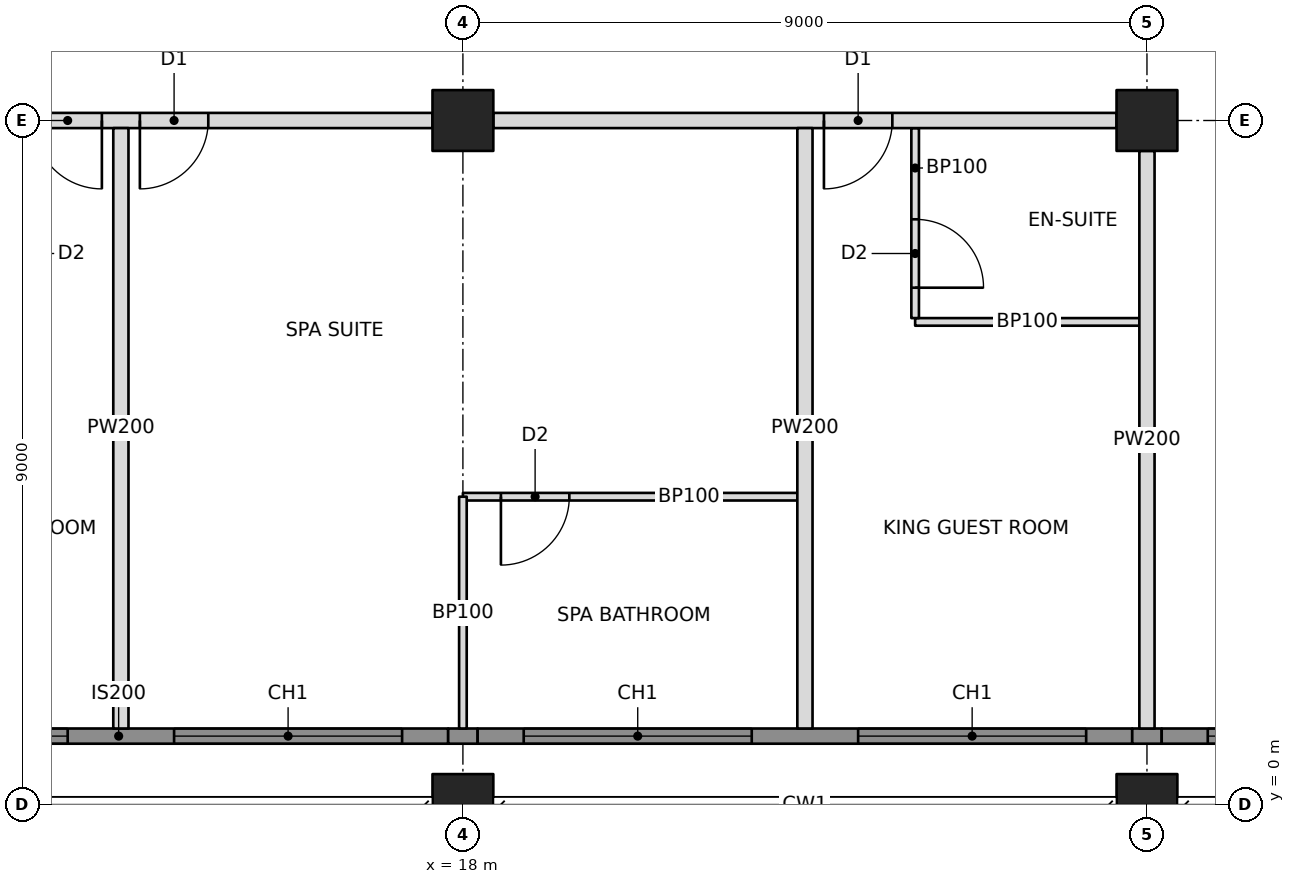
"""IFC4 building model, lengths in metres.
Left out: names, types, materials, properties, quantities, classifications, styles, units other than length and angle.
Written with IfcOpenShell. Run it as: python <this file> out.ifc"""

import sys

from ifc_helpers import new_model, si_unit, direction, frame, frame_2d, origin, origin_2d, place, context, subcontext, project, spatial, rectangle, hollow_rectangle, extrude, element, fill, save


model = new_model("IFC4")
c1 = context("Model", 3, precision=1e-05, world=origin(), true_north=direction((0.0, 1.0)))
c2 = subcontext(c1, "Body", "Model", "MODEL_VIEW")
j1 = project(units=[si_unit("LENGTHUNIT", "METRE"), si_unit("PLANEANGLEUNIT", "RADIAN")], contexts=[c1])
p1 = place(None, origin())
s1 = spatial("IfcSite", under=j1, at=p1, CompositionType="ELEMENT")
p2 = place(p1, origin())
s2 = spatial("IfcBuilding", under=s1, at=p2, CompositionType="ELEMENT")
p3 = place(p2, frame((0.0, 0.0, 124.8)))
s3 = spatial("IfcBuildingStorey", under=s2, at=p3, CompositionType="ELEMENT", Elevation=124.8)
p4 = place(p3, frame((18.0, 0.0, 0.0), z_axis=(0.0, 0.0, 1.0), x_axis=(1.0, 0.0, 0.0)))
e1 = element("IfcColumn", 1, at=p4, inside=s3, PredefinedType="COLUMN", context=c2, shape_type="SweptSolid", body=[
    extrude(hollow_rectangle(XDim=0.8, YDim=0.8, WallThickness=0.06, at=origin_2d()), origin(), (0.0, 0.0, 1.0), 3.4),
])
p5 = place(p3, frame((18.0, 9.0, 0.0), z_axis=(0.0, 0.0, 1.0), x_axis=(1.0, 0.0, 0.0)))
e2 = element("IfcColumn", 2, at=p5, inside=s3, PredefinedType="COLUMN", context=c2, shape_type="SweptSolid", body=[
    extrude(hollow_rectangle(XDim=0.8, YDim=0.8, WallThickness=0.07, at=origin_2d()), origin(), (0.0, 0.0, 1.0), 3.4),
])
p6 = place(p3, frame((27.0, 0.0, 0.0), z_axis=(0.0, 0.0, 1.0), x_axis=(1.0, 0.0, 0.0)))
e3 = element("IfcColumn", 3, at=p6, inside=s3, PredefinedType="COLUMN", context=c2, shape_type="SweptSolid", body=[
    extrude(hollow_rectangle(XDim=0.8, YDim=0.8, WallThickness=0.06, at=origin_2d()), origin(), (0.0, 0.0, 1.0), 3.4),
])
p7 = place(p3, frame((27.0, 9.0, 0.0), z_axis=(0.0, 0.0, 1.0), x_axis=(1.0, 0.0, 0.0)))
e4 = element("IfcColumn", 4, at=p7, inside=s3, PredefinedType="COLUMN", context=c2, shape_type="SweptSolid", body=[
    extrude(hollow_rectangle(XDim=0.8, YDim=0.8, WallThickness=0.07, at=origin_2d()), origin(), (0.0, 0.0, 1.0), 3.4),
])
p8 = place(p3, frame((9.4, 9.0, 0.0), z_axis=(0.0, 0.0, 1.0), x_axis=(1.0, 0.0, 0.0)))
e5 = element("IfcWall", 5, at=p8, inside=s3, PredefinedType="PARTITIONING", context=c2, shape_type="SweptSolid", body=[
    extrude(rectangle(XDim=8.2, YDim=0.2, at=frame_2d((4.1, 0.0))), origin(), (0.0, 0.0, 1.0), 2.405),
])
p9 = place(p8, frame((2.95, 0.0, 0.0)))
e6 = element("IfcOpeningElement", 6, at=p9, cuts=e5, PredefinedType="OPENING", context=c2, shape_type="SweptSolid", body=[
    extrude(rectangle(XDim=0.9, YDim=2.1, at=frame_2d((0.45, 1.05))), frame((0.0, 0.11, 0.0), z_axis=(0.0, -1.0, 0.0), x_axis=(1.0, 0.0, 0.0)), (0.0, 0.0, 1.0), 0.22),
])
p10 = place(p8, frame((4.35, 0.0, 0.0)))
e7 = element("IfcOpeningElement", 7, at=p10, cuts=e5, PredefinedType="OPENING", context=c2, shape_type="SweptSolid", body=[
    extrude(rectangle(XDim=0.9, YDim=2.1, at=frame_2d((0.45, 1.05))), frame((0.0, 0.11, 0.0), z_axis=(0.0, -1.0, 0.0), x_axis=(1.0, 0.0, 0.0)), (0.0, 0.0, 1.0), 0.22),
])
p11 = place(p3, frame((18.4, 9.0, 0.0), z_axis=(0.0, 0.0, 1.0), x_axis=(1.0, 0.0, 0.0)))
e8 = element("IfcWall", 8, at=p11, inside=s3, PredefinedType="PARTITIONING", context=c2, shape_type="SweptSolid", body=[
    extrude(rectangle(XDim=8.2, YDim=0.2, at=frame_2d((4.1, 0.0))), origin(), (0.0, 0.0, 1.0), 2.405),
])
p12 = place(p11, frame((4.35, 0.0, 0.0)))
e9 = element("IfcOpeningElement", 9, at=p12, cuts=e8, PredefinedType="OPENING", context=c2, shape_type="SweptSolid", body=[
    extrude(rectangle(XDim=0.9, YDim=2.1, at=frame_2d((0.45, 1.05))), frame((0.0, 0.11, 0.0), z_axis=(0.0, -1.0, 0.0), x_axis=(1.0, 0.0, 0.0)), (0.0, 0.0, 1.0), 0.22),
])
for number, where, z_axis, x_axis in (
    (10, (13.5, 8.9, 0.0), (0.0, 0.0, 1.0), (0.0, -1.0, 0.0)),
    (11, (22.5, 8.9, 0.0), (0.0, 0.0, 1.0), (0.0, -1.0, 0.0)),
):
    element("IfcWall", number, at=place(p3, frame(where, z_axis=z_axis, x_axis=x_axis)), inside=s3, PredefinedType="PARTITIONING", context=c2, shape_type="SweptSolid", body=[
        extrude(rectangle(XDim=7.9, YDim=0.2, at=frame_2d((3.95, 0.0))), origin(), (0.0, 0.0, 1.0), 2.404),
    ])
p13 = place(p3, frame((27.0, 8.6, 0.0), z_axis=(0.0, 0.0, 1.0), x_axis=(0.0, -1.0, 0.0)))
e12 = element("IfcWall", 12, at=p13, inside=s3, PredefinedType="PARTITIONING", context=c2, shape_type="SweptSolid", body=[
    extrude(rectangle(XDim=7.6, YDim=0.2, at=frame_2d((3.8, 0.0))), origin(), (0.0, 0.0, 1.0), 2.405),
])
p14 = place(p3, frame((18.0, 4.05, 0.0), z_axis=(0.0, 0.0, 1.0), x_axis=(1.0, 0.0, 0.0)))
e13 = element("IfcWall", 13, at=p14, inside=s3, PredefinedType="PARTITIONING", context=c2, shape_type="SweptSolid", body=[
    extrude(rectangle(XDim=4.4, YDim=0.1, at=frame_2d((2.2, 0.0))), origin(), (0.0, 0.0, 1.0), 2.404),
])
p15 = place(p14, frame((0.5, 0.0, 0.0)))
e14 = element("IfcOpeningElement", 14, at=p15, cuts=e13, PredefinedType="OPENING", context=c2, shape_type="SweptSolid", body=[
    extrude(rectangle(XDim=0.9, YDim=2.1, at=frame_2d((0.45, 1.05))), frame((0.0, 0.06, 0.0), z_axis=(0.0, -1.0, 0.0), x_axis=(1.0, 0.0, 0.0)), (0.0, 0.0, 1.0), 0.12),
])
p16 = place(p3, frame((18.0, 4.05, 0.0), z_axis=(0.0, 0.0, 1.0), x_axis=(0.0, -1.0, 0.0)))
e15 = element("IfcWall", 15, at=p16, inside=s3, PredefinedType="PARTITIONING", context=c2, shape_type="SweptSolid", body=[
    extrude(rectangle(XDim=3.05, YDim=0.1, at=frame_2d((1.525, 0.0))), origin(), (0.0, 0.0, 1.0), 2.405),
])
p17 = place(p3, frame((23.95, 6.35, 0.0), z_axis=(0.0, 0.0, 1.0), x_axis=(1.0, 0.0, 0.0)))
e16 = element("IfcWall", 16, at=p17, inside=s3, PredefinedType="PARTITIONING", context=c2, shape_type="SweptSolid", body=[
    extrude(rectangle(XDim=2.95, YDim=0.1, at=frame_2d((1.475, 0.0))), origin(), (0.0, 0.0, 1.0), 2.404),
])
p18 = place(p3, frame((23.95, 8.9, 0.0), z_axis=(0.0, 0.0, 1.0), x_axis=(0.0, -1.0, 0.0)))
e17 = element("IfcWall", 17, at=p18, inside=s3, PredefinedType="PARTITIONING", context=c2, shape_type="SweptSolid", body=[
    extrude(rectangle(XDim=2.5, YDim=0.1, at=frame_2d((1.25, 0.0))), origin(), (0.0, 0.0, 1.0), 2.404),
])
p19 = place(p18, frame((1.2, 0.0, 0.0)))
e18 = element("IfcOpeningElement", 18, at=p19, cuts=e17, PredefinedType="OPENING", context=c2, shape_type="SweptSolid", body=[
    extrude(rectangle(XDim=0.9, YDim=2.1, at=frame_2d((0.45, 1.05))), frame((0.0, 0.06, 0.0), z_axis=(0.0, -1.0, 0.0), x_axis=(1.0, 0.0, 0.0)), (0.0, 0.0, 1.0), 0.12),
])
p20 = place(p3, frame((9.135, 0.9, 0.0), z_axis=(0.0, 0.0, 1.0), x_axis=(1.0, 0.0, 0.0)))
e19 = element("IfcWall", 19, at=p20, inside=s3, PredefinedType="SOLIDWALL", context=c2, shape_type="SweptSolid", body=[
    extrude(rectangle(XDim=8.671, YDim=0.2, at=frame_2d((4.335, 0.0))), origin(), (0.0, 0.0, 1.0), 3.2),
])
p21 = place(p20, frame((0.665, 0.0, 0.6)))
e20 = element("IfcOpeningElement", 20, at=p21, cuts=e19, PredefinedType="OPENING", context=c2, shape_type="SweptSolid", body=[
    extrude(rectangle(XDim=3.0, YDim=2.2, at=frame_2d((1.5, 1.1))), frame((0.0, 0.11, 0.0), z_axis=(0.0, -1.0, 0.0), x_axis=(1.0, 0.0, 0.0)), (0.0, 0.0, 1.0), 0.22),
])
p22 = place(p20, frame((5.065, 0.0, 0.6)))
e21 = element("IfcOpeningElement", 21, at=p22, cuts=e19, PredefinedType="OPENING", context=c2, shape_type="SweptSolid", body=[
    extrude(rectangle(XDim=3.0, YDim=2.2, at=frame_2d((1.5, 1.1))), frame((0.0, 0.11, 0.0), z_axis=(0.0, -1.0, 0.0), x_axis=(1.0, 0.0, 0.0)), (0.0, 0.0, 1.0), 0.22),
])
p23 = place(p3, frame((17.806, 0.9, 0.0), z_axis=(0.0, 0.0, 1.0), x_axis=(1.0, 0.0, 0.0)))
e22 = element("IfcWall", 22, at=p23, inside=s3, PredefinedType="SOLIDWALL", context=c2, shape_type="SweptSolid", body=[
    extrude(rectangle(XDim=0.388, YDim=0.2, at=frame_2d((0.194, 0.0))), origin(), (0.0, 0.0, 1.0), 2.404),
])
p24 = place(p3, frame((18.194, 0.9, 0.0), z_axis=(0.0, 0.0, 1.0), x_axis=(1.0, 0.0, 0.0)))
e23 = element("IfcWall", 23, at=p24, inside=s3, PredefinedType="SOLIDWALL", context=c2, shape_type="SweptSolid", body=[
    extrude(rectangle(XDim=8.612, YDim=0.2, at=frame_2d((4.306, 0.0))), origin(), (0.0, 0.0, 1.0), 3.2),
])
p25 = place(p24, frame((0.606, 0.0, 0.6)))
e24 = element("IfcOpeningElement", 24, at=p25, cuts=e23, PredefinedType="OPENING", context=c2, shape_type="SweptSolid", body=[
    extrude(rectangle(XDim=3.0, YDim=2.2, at=frame_2d((1.5, 1.1))), frame((0.0, 0.11, 0.0), z_axis=(0.0, -1.0, 0.0), x_axis=(1.0, 0.0, 0.0)), (0.0, 0.0, 1.0), 0.22),
])
p26 = place(p24, frame((5.006, 0.0, 0.6)))
e25 = element("IfcOpeningElement", 25, at=p26, cuts=e23, PredefinedType="OPENING", context=c2, shape_type="SweptSolid", body=[
    extrude(rectangle(XDim=3.0, YDim=2.2, at=frame_2d((1.5, 1.1))), frame((0.0, 0.11, 0.0), z_axis=(0.0, -1.0, 0.0), x_axis=(1.0, 0.0, 0.0)), (0.0, 0.0, 1.0), 0.22),
])
p27 = place(p3, frame((26.806, 0.9, 0.0), z_axis=(0.0, 0.0, 1.0), x_axis=(1.0, 0.0, 0.0)))
e26 = element("IfcWall", 26, at=p27, inside=s3, PredefinedType="SOLIDWALL", context=c2, shape_type="SweptSolid", body=[
    extrude(rectangle(XDim=0.388, YDim=0.2, at=frame_2d((0.194, 0.0))), origin(), (0.0, 0.0, 1.0), 2.404),
])
p28 = place(p3, frame((27.194, 0.9, 0.0), z_axis=(0.0, 0.0, 1.0), x_axis=(1.0, 0.0, 0.0)))
e27 = element("IfcWall", 27, at=p28, inside=s3, PredefinedType="SOLIDWALL", context=c2, shape_type="SweptSolid", body=[
    extrude(rectangle(XDim=8.671, YDim=0.2, at=frame_2d((4.335, 0.0))), origin(), (0.0, 0.0, 1.0), 3.2),
])
p29 = place(p28, frame((0.606, 0.0, 0.6)))
e28 = element("IfcOpeningElement", 28, at=p29, cuts=e27, PredefinedType="OPENING", context=c2, shape_type="SweptSolid", body=[
    extrude(rectangle(XDim=3.0, YDim=2.2, at=frame_2d((1.5, 1.1))), frame((0.0, 0.11, 0.0), z_axis=(0.0, -1.0, 0.0), x_axis=(1.0, 0.0, 0.0)), (0.0, 0.0, 1.0), 0.22),
])
p30 = place(p28, frame((5.006, 0.0, 0.6)))
e29 = element("IfcOpeningElement", 29, at=p30, cuts=e27, PredefinedType="OPENING", context=c2, shape_type="SweptSolid", body=[
    extrude(rectangle(XDim=3.0, YDim=2.2, at=frame_2d((1.5, 1.1))), frame((0.0, 0.11, 0.0), z_axis=(0.0, -1.0, 0.0), x_axis=(1.0, 0.0, 0.0)), (0.0, 0.0, 1.0), 0.22),
])
p31 = place(p21, origin())
e30 = element("IfcWindow", 30, at=p31, inside=s3, PartitioningType="TRIPLE_PANEL_VERTICAL", PredefinedType="WINDOW", context=c2, shape_type="SweptSolid", body=[
    extrude(rectangle(XDim=3.0, YDim=2.2, at=frame_2d((1.5, 1.1))), frame((0.0, 0.03, 0.0), z_axis=(0.0, -1.0, 0.0), x_axis=(1.0, 0.0, 0.0)), (0.0, 0.0, 1.0), 0.06),
])
fill(e20, e30)
p32 = place(p22, origin())
e31 = element("IfcWindow", 31, at=p32, inside=s3, PartitioningType="TRIPLE_PANEL_VERTICAL", PredefinedType="WINDOW", context=c2, shape_type="SweptSolid", body=[
    extrude(rectangle(XDim=3.0, YDim=2.2, at=frame_2d((1.5, 1.1))), frame((0.0, 0.03, 0.0), z_axis=(0.0, -1.0, 0.0), x_axis=(1.0, 0.0, 0.0)), (0.0, 0.0, 1.0), 0.06),
])
fill(e21, e31)
p33 = place(p25, origin())
e32 = element("IfcWindow", 32, at=p33, inside=s3, PartitioningType="TRIPLE_PANEL_VERTICAL", PredefinedType="WINDOW", context=c2, shape_type="SweptSolid", body=[
    extrude(rectangle(XDim=3.0, YDim=2.2, at=frame_2d((1.5, 1.1))), frame((0.0, 0.03, 0.0), z_axis=(0.0, -1.0, 0.0), x_axis=(1.0, 0.0, 0.0)), (0.0, 0.0, 1.0), 0.06),
])
fill(e24, e32)
p34 = place(p26, origin())
e33 = element("IfcWindow", 33, at=p34, inside=s3, PartitioningType="TRIPLE_PANEL_VERTICAL", PredefinedType="WINDOW", context=c2, shape_type="SweptSolid", body=[
    extrude(rectangle(XDim=3.0, YDim=2.2, at=frame_2d((1.5, 1.1))), frame((0.0, 0.03, 0.0), z_axis=(0.0, -1.0, 0.0), x_axis=(1.0, 0.0, 0.0)), (0.0, 0.0, 1.0), 0.06),
])
fill(e25, e33)
p35 = place(p29, origin())
e34 = element("IfcWindow", 34, at=p35, inside=s3, PartitioningType="TRIPLE_PANEL_VERTICAL", PredefinedType="WINDOW", context=c2, shape_type="SweptSolid", body=[
    extrude(rectangle(XDim=3.0, YDim=2.2, at=frame_2d((1.5, 1.1))), frame((0.0, 0.03, 0.0), z_axis=(0.0, -1.0, 0.0), x_axis=(1.0, 0.0, 0.0)), (0.0, 0.0, 1.0), 0.06),
])
fill(e28, e34)
p36 = place(p9, frame((0.9, 0.0, 0.0), z_axis=(0.0, 0.0, 1.0), x_axis=(-1.0, 0.0, 0.0)))
e35 = element("IfcDoor", 35, at=p36, inside=s3, OperationType="SINGLE_SWING_LEFT", PredefinedType="DOOR", context=c2, shape_type="SweptSolid", body=[
    extrude(rectangle(XDim=0.9, YDim=2.1, at=frame_2d((0.45, 1.05))), frame((0.0, 0.025, 0.0), z_axis=(0.0, -1.0, 0.0), x_axis=(1.0, 0.0, 0.0)), (0.0, 0.0, 1.0), 0.05),
])
fill(e6, e35)
p37 = place(p15, frame((0.9, 0.0, 0.0), z_axis=(0.0, 0.0, 1.0), x_axis=(-1.0, 0.0, 0.0)))
e36 = element("IfcDoor", 36, at=p37, inside=s3, OperationType="SINGLE_SWING_RIGHT", PredefinedType="DOOR", context=c2, shape_type="SweptSolid", body=[
    extrude(rectangle(XDim=0.9, YDim=2.1, at=frame_2d((0.45, 1.05))), frame((0.0, 0.025, 0.0), z_axis=(0.0, -1.0, 0.0), x_axis=(1.0, 0.0, 0.0)), (0.0, 0.0, 1.0), 0.05),
])
fill(e14, e36)
p38 = place(p10, frame((0.9, 0.0, 0.0), z_axis=(0.0, 0.0, 1.0), x_axis=(-1.0, 0.0, 0.0)))
e37 = element("IfcDoor", 37, at=p38, inside=s3, OperationType="SINGLE_SWING_RIGHT", PredefinedType="DOOR", context=c2, shape_type="SweptSolid", body=[
    extrude(rectangle(XDim=0.9, YDim=2.1, at=frame_2d((0.45, 1.05))), frame((0.0, 0.025, 0.0), z_axis=(0.0, -1.0, 0.0), x_axis=(1.0, 0.0, 0.0)), (0.0, 0.0, 1.0), 0.05),
])
fill(e7, e37)
p39 = place(p19, origin())
e38 = element("IfcDoor", 38, at=p39, inside=s3, OperationType="SINGLE_SWING_RIGHT", PredefinedType="DOOR", context=c2, shape_type="SweptSolid", body=[
    extrude(rectangle(XDim=0.9, YDim=2.1, at=frame_2d((0.45, 1.05))), frame((0.0, 0.025, 0.0), z_axis=(0.0, -1.0, 0.0), x_axis=(1.0, 0.0, 0.0)), (0.0, 0.0, 1.0), 0.05),
])
fill(e18, e38)
p40 = place(p12, frame((0.9, 0.0, 0.0), z_axis=(0.0, 0.0, 1.0), x_axis=(-1.0, 0.0, 0.0)))
e39 = element("IfcDoor", 39, at=p40, inside=s3, OperationType="SINGLE_SWING_RIGHT", PredefinedType="DOOR", context=c2, shape_type="SweptSolid", body=[
    extrude(rectangle(XDim=0.9, YDim=2.1, at=frame_2d((0.45, 1.05))), frame((0.0, 0.025, 0.0), z_axis=(0.0, -1.0, 0.0), x_axis=(1.0, 0.0, 0.0)), (0.0, 0.0, 1.0), 0.05),
])
fill(e9, e39)
save(model, sys.argv[1])
